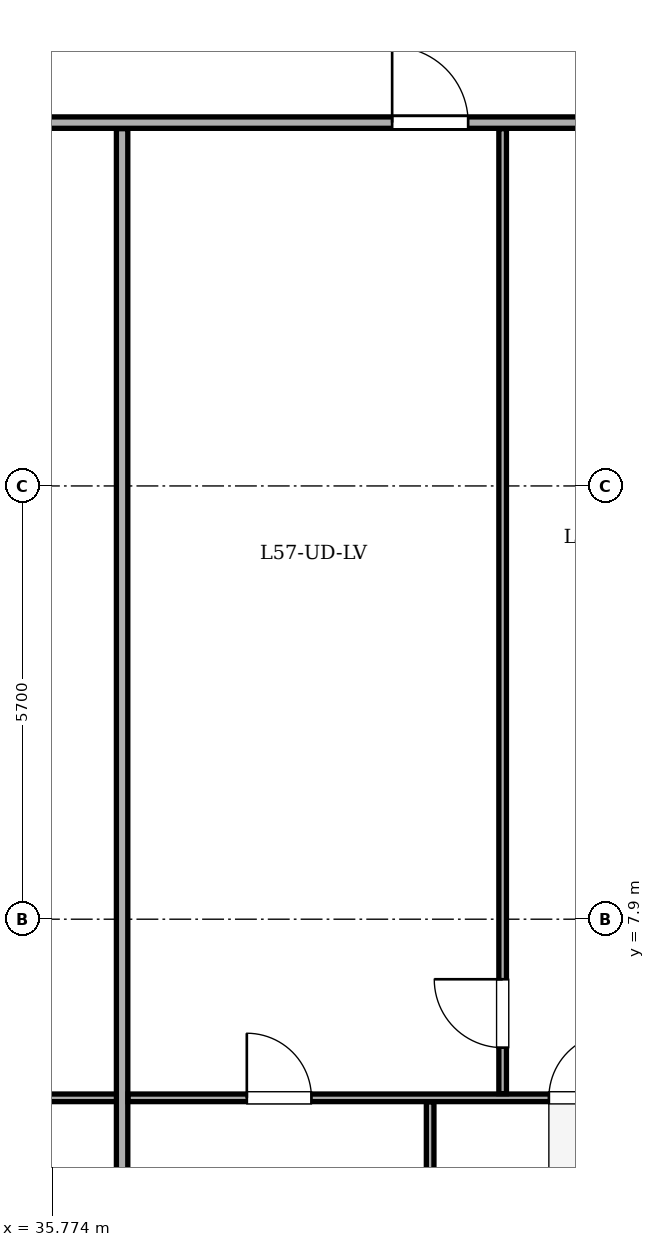
"""IFC4 building model, lengths in metres.
Left out: names, types, materials, properties, quantities, classifications, styles, units other than length and angle.
Written with IfcOpenShell. Run it as: python <this file> out.ifc"""

import sys

from ifc_helpers import new_model, si_unit, direction, frame, frame_2d, origin, place, context, subcontext, project, spatial, rectangle, extrude, element, fill, save


model = new_model("IFC4")
c1 = context("Model", 3, precision=1e-05, world=origin(), true_north=direction((0.0, 1.0)))
c2 = subcontext(c1, "Body", "Model", "MODEL_VIEW")
j1 = project(units=[si_unit("LENGTHUNIT", "METRE"), si_unit("PLANEANGLEUNIT", "RADIAN")], contexts=[c1])
p1 = place(None, origin())
s1 = spatial("IfcSite", under=j1, at=p1, CompositionType="ELEMENT")
p2 = place(p1, origin())
s2 = spatial("IfcBuilding", under=s1, at=p2, CompositionType="ELEMENT")
p3 = place(p2, frame((0.0, 0.0, 221.1)))
s3 = spatial("IfcBuildingStorey", under=s2, at=p3, CompositionType="ELEMENT", Elevation=221.1)
p4 = place(p3, frame((10.9, 18.38, 0.0), z_axis=(0.0, 0.0, 1.0), x_axis=(1.0, 0.0, 0.0)))
e1 = element("IfcWall", 1, at=p4, inside=s3, PredefinedType="PARTITIONING", context=c2, shape_type="SweptSolid", body=[
    extrude(rectangle(XDim=34.02, YDim=0.15, at=frame_2d((17.01, 0.0))), origin(), (0.0, 0.0, 1.0), 3.1),
])
p5 = place(p4, frame((3.674, 0.0, 0.0)))
e2 = element("IfcOpeningElement", 2, at=p5, cuts=e1, PredefinedType="OPENING", context=c2, shape_type="SweptSolid", body=[
    extrude(rectangle(XDim=1.0, YDim=2.1, at=frame_2d((0.5, 1.05))), frame((0.0, 0.085, 0.0), z_axis=(0.0, -1.0, 0.0), x_axis=(1.0, 0.0, 0.0)), (0.0, 0.0, 1.0), 0.17),
])
p6 = place(p4, frame((12.118, 0.0, 0.0)))
e3 = element("IfcOpeningElement", 3, at=p6, cuts=e1, PredefinedType="OPENING", context=c2, shape_type="SweptSolid", body=[
    extrude(rectangle(XDim=1.0, YDim=2.1, at=frame_2d((0.5, 1.05))), frame((0.0, 0.085, 0.0), z_axis=(0.0, -1.0, 0.0), x_axis=(1.0, 0.0, 0.0)), (0.0, 0.0, 1.0), 0.17),
])
p7 = place(p4, frame((20.901, 0.0, 0.0)))
e4 = element("IfcOpeningElement", 4, at=p7, cuts=e1, PredefinedType="OPENING", context=c2, shape_type="SweptSolid", body=[
    extrude(rectangle(XDim=1.0, YDim=2.1, at=frame_2d((0.5, 1.05))), frame((0.0, 0.085, 0.0), z_axis=(0.0, -1.0, 0.0), x_axis=(1.0, 0.0, 0.0)), (0.0, 0.0, 1.0), 0.17),
])
p8 = place(p4, frame((29.346, 0.0, 0.0)))
e5 = element("IfcOpeningElement", 5, at=p8, cuts=e1, PredefinedType="OPENING", context=c2, shape_type="SweptSolid", body=[
    extrude(rectangle(XDim=1.0, YDim=2.1, at=frame_2d((0.5, 1.05))), frame((0.0, 0.085, 0.0), z_axis=(0.0, -1.0, 0.0), x_axis=(1.0, 0.0, 0.0)), (0.0, 0.0, 1.0), 0.17),
])
p9 = place(p3, frame((27.99, 5.55, 0.0), z_axis=(0.0, 0.0, 1.0), x_axis=(1.0, 0.0, 0.0)))
e6 = element("IfcWall", 6, at=p9, inside=s3, PredefinedType="PARTITIONING", context=c2, shape_type="SweptSolid", body=[
    extrude(rectangle(XDim=8.743, YDim=0.1, at=frame_2d((4.372, 0.0))), origin(), (0.0, 0.0, 1.0), 3.1),
])
p10 = place(p9, frame((0.625, 0.0, 0.0)))
e7 = element("IfcOpeningElement", 7, at=p10, cuts=e6, PredefinedType="OPENING", context=c2, shape_type="SweptSolid", body=[
    extrude(rectangle(XDim=0.85, YDim=2.05, at=frame_2d((0.425, 1.025))), frame((0.0, 0.06, 0.0), z_axis=(0.0, -1.0, 0.0), x_axis=(1.0, 0.0, 0.0)), (0.0, 0.0, 1.0), 0.12),
])
p11 = place(p9, frame((3.212, 0.0, 0.0)))
e8 = element("IfcOpeningElement", 8, at=p11, cuts=e6, PredefinedType="OPENING", context=c2, shape_type="SweptSolid", body=[
    extrude(rectangle(XDim=0.85, YDim=2.05, at=frame_2d((0.425, 1.025))), frame((0.0, 0.06, 0.0), z_axis=(0.0, -1.0, 0.0), x_axis=(1.0, 0.0, 0.0)), (0.0, 0.0, 1.0), 0.12),
])
p12 = place(p9, frame((6.449, 0.0, 0.0)))
e9 = element("IfcOpeningElement", 9, at=p12, cuts=e6, PredefinedType="OPENING", context=c2, shape_type="SweptSolid", body=[
    extrude(rectangle(XDim=0.9, YDim=2.05, at=frame_2d((0.45, 1.025))), frame((0.0, 0.06, 0.0), z_axis=(0.0, -1.0, 0.0), x_axis=(1.0, 0.0, 0.0)), (0.0, 0.0, 1.0), 0.12),
])
p13 = place(p3, frame((36.693, 3.045, 0.0), z_axis=(0.0, 0.0, 1.0), x_axis=(0.0, 1.0, 0.0)))
e10 = element("IfcWall", 10, at=p13, inside=s3, PredefinedType="PARTITIONING", context=c2, shape_type="SweptSolid", body=[
    extrude(rectangle(XDim=15.255, YDim=0.15, at=frame_2d((7.627, 0.0))), origin(), (0.0, 0.0, 1.0), 2.725),
])
p14 = place(p3, frame((36.773, 5.55, 0.0), z_axis=(0.0, 0.0, 1.0), x_axis=(1.0, 0.0, 0.0)))
e11 = element("IfcWall", 11, at=p14, inside=s3, PredefinedType="PARTITIONING", context=c2, shape_type="SweptSolid", body=[
    extrude(rectangle(XDim=8.067, YDim=0.1, at=frame_2d((4.034, 0.0))), origin(), (0.0, 0.0, 1.0), 3.1),
])
p15 = place(p14, frame((1.561, 0.0, 0.0)))
e12 = element("IfcOpeningElement", 12, at=p15, cuts=e11, PredefinedType="OPENING", context=c2, shape_type="SweptSolid", body=[
    extrude(rectangle(XDim=0.85, YDim=2.05, at=frame_2d((0.425, 1.025))), frame((0.0, 0.06, 0.0), z_axis=(0.0, -1.0, 0.0), x_axis=(1.0, 0.0, 0.0)), (0.0, 0.0, 1.0), 0.12),
])
p16 = place(p14, frame((5.535, 0.0, 0.0)))
e13 = element("IfcOpeningElement", 13, at=p16, cuts=e11, PredefinedType="OPENING", context=c2, shape_type="SweptSolid", body=[
    extrude(rectangle(XDim=0.85, YDim=2.05, at=frame_2d((0.425, 1.025))), frame((0.0, 0.06, 0.0), z_axis=(0.0, -1.0, 0.0), x_axis=(1.0, 0.0, 0.0)), (0.0, 0.0, 1.0), 0.12),
])
p17 = place(p3, frame((41.7, 5.605, 0.0), z_axis=(0.0, 0.0, 1.0), x_axis=(0.0, 1.0, 0.0)))
e14 = element("IfcWall", 14, at=p17, inside=s3, PredefinedType="PARTITIONING", context=c2, shape_type="SweptSolid", body=[
    extrude(rectangle(XDim=12.695, YDim=0.1, at=frame_2d((6.348, 0.0))), origin(), (0.0, 0.0, 1.0), 3.1),
])
p18 = place(p17, frame((0.605, 0.0, 0.0)))
e15 = element("IfcOpeningElement", 15, at=p18, cuts=e14, PredefinedType="OPENING", context=c2, shape_type="SweptSolid", body=[
    extrude(rectangle(XDim=0.9, YDim=2.05, at=frame_2d((0.45, 1.025))), frame((0.0, 0.06, 0.0), z_axis=(0.0, -1.0, 0.0), x_axis=(1.0, 0.0, 0.0)), (0.0, 0.0, 1.0), 0.12),
])
p19 = place(p3, frame((40.746, 3.045, 0.0), z_axis=(0.0, 0.0, 1.0), x_axis=(0.0, 1.0, 0.0)))
e16 = element("IfcWall", 16, at=p19, inside=s3, PredefinedType="PARTITIONING", context=c2, shape_type="SweptSolid", body=[
    extrude(rectangle(XDim=2.45, YDim=0.1, at=frame_2d((1.225, 0.0))), origin(), (0.0, 0.0, 1.0), 3.1),
])
p20 = place(p8, origin())
e17 = element("IfcDoor", 17, at=p20, inside=s3, OperationType="SINGLE_SWING_LEFT", PredefinedType="DOOR", context=c2, shape_type="SweptSolid", body=[
    extrude(rectangle(XDim=1.0, YDim=2.1, at=frame_2d((0.5, 1.05))), frame((0.0, 0.025, 0.0), z_axis=(0.0, -1.0, 0.0), x_axis=(1.0, 0.0, 0.0)), (0.0, 0.0, 1.0), 0.05),
])
fill(e5, e17)
p21 = place(p18, origin())
e18 = element("IfcDoor", 18, at=p21, inside=s3, OperationType="SINGLE_SWING_RIGHT", PredefinedType="DOOR", context=c2, shape_type="SweptSolid", body=[
    extrude(rectangle(XDim=0.9, YDim=2.05, at=frame_2d((0.45, 1.025))), frame((0.0, 0.025, 0.0), z_axis=(0.0, -1.0, 0.0), x_axis=(1.0, 0.0, 0.0)), (0.0, 0.0, 1.0), 0.05),
])
fill(e15, e18)
p22 = place(p15, origin())
e19 = element("IfcDoor", 19, at=p22, inside=s3, OperationType="SINGLE_SWING_LEFT", PredefinedType="DOOR", context=c2, shape_type="SweptSolid", body=[
    extrude(rectangle(XDim=0.85, YDim=2.05, at=frame_2d((0.425, 1.025))), frame((0.0, 0.025, 0.0), z_axis=(0.0, -1.0, 0.0), x_axis=(1.0, 0.0, 0.0)), (0.0, 0.0, 1.0), 0.05),
])
fill(e12, e19)
p23 = place(p16, origin())
e20 = element("IfcDoor", 20, at=p23, inside=s3, OperationType="SINGLE_SWING_RIGHT", PredefinedType="DOOR", context=c2, shape_type="SweptSolid", body=[
    extrude(rectangle(XDim=0.85, YDim=2.05, at=frame_2d((0.425, 1.025))), frame((0.0, 0.025, 0.0), z_axis=(0.0, -1.0, 0.0), x_axis=(1.0, 0.0, 0.0)), (0.0, 0.0, 1.0), 0.05),
])
fill(e13, e20)
save(model, sys.argv[1])
